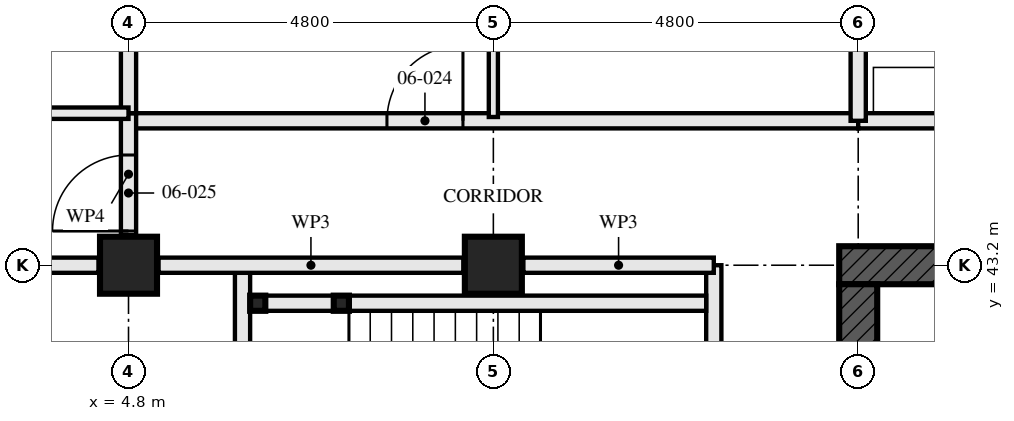
"""IFC4 building model, lengths in metres.
Left out: names, types, materials, properties, quantities, classifications, styles, units other than length and angle.
Written with IfcOpenShell. Run it as: python <this file> out.ifc"""

import sys

from ifc_helpers import new_model, si_unit, direction, frame, frame_2d, origin, origin_2d, place, context, subcontext, project, spatial, rectangle, hollow_rectangle, extrude, element, fill, save


model = new_model("IFC4")
c1 = context("Model", 3, precision=1e-05, world=origin(), true_north=direction((0.0, 1.0)))
c2 = subcontext(c1, "Body", "Model", "MODEL_VIEW")
j1 = project(units=[si_unit("LENGTHUNIT", "METRE"), si_unit("PLANEANGLEUNIT", "RADIAN")], contexts=[c1])
p1 = place(None, origin())
s1 = spatial("IfcSite", under=j1, at=p1, CompositionType="ELEMENT")
p2 = place(p1, origin())
s2 = spatial("IfcBuilding", under=s1, at=p2, CompositionType="ELEMENT")
p3 = place(p2, frame((0.0, 0.0, 27.0)))
s3 = spatial("IfcBuildingStorey", under=s2, at=p3, CompositionType="ELEMENT", Elevation=27.0)
for number, where, z_axis, x_axis in (
    (1, (4.8, 43.2, 0.0), (0.0, 0.0, 1.0), (0.0, 1.0, 0.0)),
    (2, (9.6, 43.2, 0.0), (0.0, 0.0, 1.0), (0.0, 1.0, 0.0)),
):
    element("IfcColumn", number, at=place(p3, frame(where, z_axis=z_axis, x_axis=x_axis)), inside=s3, PredefinedType="COLUMN", context=c2, shape_type="SweptSolid", body=[
        extrude(hollow_rectangle(XDim=0.75, YDim=0.75, WallThickness=0.08, at=origin_2d()), origin(), (0.0, 0.0, 1.0), 3.5),
    ])
p4 = place(p3, frame((29.05, 43.2, -0.17), z_axis=(0.0, 0.0, 1.0), x_axis=(-1.0, 0.0, 0.0)))
e3 = element("IfcWall", 3, at=p4, inside=s3, PredefinedType="SHEAR", context=c2, shape_type="SweptSolid", body=[
    extrude(rectangle(XDim=14.9, YDim=0.5, at=frame_2d((7.45, 0.0))), origin(), (0.0, 0.0, 1.0), 3.5),
])
p5 = place(p4, frame((6.85, 0.0, 0.17)))
e4 = element("IfcOpeningElement", 4, at=p5, cuts=e3, PredefinedType="OPENING", context=c2, shape_type="SweptSolid", body=[
    extrude(rectangle(XDim=1.2, YDim=2.1, at=frame_2d((0.6, 1.05))), frame((0.0, 0.26, 0.0), z_axis=(0.0, -1.0, 0.0), x_axis=(1.0, 0.0, 0.0)), (0.0, 0.0, 1.0), 0.521),
])
p6 = place(p3, frame((14.4, 42.95, -0.17), z_axis=(0.0, 0.0, 1.0), x_axis=(0.0, -1.0, 0.0)))
e5 = element("IfcWall", 5, at=p6, inside=s3, PredefinedType="SHEAR", context=c2, shape_type="SweptSolid", body=[
    extrude(rectangle(XDim=13.9, YDim=0.5, at=frame_2d((6.95, 0.0))), origin(), (0.0, 0.0, 1.0), 3.5),
])
p7 = place(p6, frame((6.35, 0.0, 0.17)))
e6 = element("IfcOpeningElement", 6, at=p7, cuts=e5, PredefinedType="OPENING", context=c2, shape_type="SweptSolid", body=[
    extrude(rectangle(XDim=1.2, YDim=2.1, at=frame_2d((0.6, 1.05))), frame((0.0, 0.26, 0.0), z_axis=(0.0, -1.0, 0.0), x_axis=(1.0, 0.0, 0.0)), (0.0, 0.0, 1.0), 0.521),
])
for number, where, z_axis, x_axis in (
    (7, (6.5, 42.7, 0.0), (0.0, 0.0, 1.0), (1.0, 0.0, 0.0)),
    (8, (7.6, 42.7, 0.0), (0.0, 0.0, 1.0), (1.0, 0.0, 0.0)),
):
    element("IfcColumn", number, at=place(p3, frame(where, z_axis=z_axis, x_axis=x_axis)), inside=s3, PredefinedType="COLUMN", context=c2, shape_type="SweptSolid", body=[
        extrude(hollow_rectangle(XDim=0.2, YDim=0.2, WallThickness=0.008, at=origin_2d()), origin(), (0.0, 0.0, 1.0), 3.33),
    ])
p8 = place(p3, frame((6.6, 42.7, 0.0), z_axis=(0.0, 0.0, 1.0), x_axis=(1.0, 0.0, 0.0)))
e9 = element("IfcWall", 9, at=p8, inside=s3, PredefinedType="SOLIDWALL", context=c2, shape_type="SweptSolid", body=[
    extrude(rectangle(XDim=0.9, YDim=0.2, at=frame_2d((0.45, 0.0))), origin(), (0.0, 0.0, 1.0), 2.99),
])
p9 = place(p3, frame((7.7, 42.7, 0.0), z_axis=(0.0, 0.0, 1.0), x_axis=(1.0, 0.0, 0.0)))
e10 = element("IfcWall", 10, at=p9, inside=s3, PredefinedType="SOLIDWALL", context=c2, shape_type="SweptSolid", body=[
    extrude(rectangle(XDim=4.7, YDim=0.2, at=frame_2d((2.35, 0.0))), origin(), (0.0, 0.0, 1.0), 2.99),
])
p10 = place(p3, frame((6.3, 43.1, 0.0), z_axis=(0.0, 0.0, 1.0), x_axis=(0.0, -1.0, 0.0)))
e11 = element("IfcWall", 11, at=p10, inside=s3, PredefinedType="SOLIDWALL", context=c2, shape_type="SweptSolid", body=[
    extrude(rectangle(XDim=3.3, YDim=0.2, at=frame_2d((1.65, 0.0))), origin(), (0.0, 0.0, 1.0), 3.33),
])
p11 = place(p3, frame((12.5, 43.2, 0.0), z_axis=(0.0, 0.0, 1.0), x_axis=(0.0, -1.0, 0.0)))
e12 = element("IfcWall", 12, at=p11, inside=s3, PredefinedType="PARTITIONING", context=c2, shape_type="SweptSolid", body=[
    extrude(rectangle(XDim=14.4, YDim=0.2, at=frame_2d((7.2, 0.0))), origin(), (0.0, 0.0, 1.0), 2.55),
])
p12 = place(p11, frame((1.4, 0.0, 0.0)))
e13 = element("IfcOpeningElement", 13, at=p12, cuts=e12, PredefinedType="OPENING", context=c2, shape_type="SweptSolid", body=[
    extrude(rectangle(XDim=1.0, YDim=2.1, at=frame_2d((0.5, 1.05))), frame((0.0, 0.111, 0.0), z_axis=(0.0, -1.0, 0.0), x_axis=(1.0, 0.0, 0.0)), (0.0, 0.0, 1.0), 0.221),
])
p13 = place(p11, frame((5.2, 0.0, 0.0)))
e14 = element("IfcOpeningElement", 14, at=p13, cuts=e12, PredefinedType="OPENING", context=c2, shape_type="SweptSolid", body=[
    extrude(rectangle(XDim=1.0, YDim=2.1, at=frame_2d((0.5, 1.05))), frame((0.0, 0.111, 0.0), z_axis=(0.0, -1.0, 0.0), x_axis=(1.0, 0.0, 0.0)), (0.0, 0.0, 1.0), 0.221),
])
p14 = place(p11, frame((10.0, 0.0, 0.0)))
e15 = element("IfcOpeningElement", 15, at=p14, cuts=e12, PredefinedType="OPENING", context=c2, shape_type="SweptSolid", body=[
    extrude(rectangle(XDim=1.0, YDim=2.1, at=frame_2d((0.5, 1.05))), frame((0.0, 0.111, 0.0), z_axis=(0.0, -1.0, 0.0), x_axis=(1.0, 0.0, 0.0)), (0.0, 0.0, 1.0), 0.221),
])
p15 = place(p3, frame((9.6, 52.2, 0.0), z_axis=(0.0, 0.0, 1.0), x_axis=(0.0, -1.0, 0.0)))
e16 = element("IfcWall", 16, at=p15, inside=s3, PredefinedType="PARTITIONING", context=c2, shape_type="SweptSolid", body=[
    extrude(rectangle(XDim=7.05, YDim=0.12, at=frame_2d((3.525, 0.0))), origin(), (0.0, 0.0, 1.0), 2.55),
])
p16 = place(p15, frame((3.075, 0.0, 0.0)))
e17 = element("IfcOpeningElement", 17, at=p16, cuts=e16, PredefinedType="OPENING", context=c2, shape_type="SweptSolid", body=[
    extrude(rectangle(XDim=0.9, YDim=2.1, at=frame_2d((0.45, 1.05))), frame((0.0, 0.071, 0.0), z_axis=(0.0, -1.0, 0.0), x_axis=(1.0, 0.0, 0.0)), (0.0, 0.0, 1.0), 0.141),
])
p17 = place(p3, frame((4.8, 52.48, 0.0), z_axis=(0.0, 0.0, 1.0), x_axis=(0.0, -1.0, 0.0)))
e18 = element("IfcWall", 18, at=p17, inside=s3, PredefinedType="PARTITIONING", context=c2, shape_type="SweptSolid", body=[
    extrude(rectangle(XDim=7.28, YDim=0.2, at=frame_2d((3.64, 0.0))), origin(), (0.0, 0.0, 1.0), 2.55),
])
p18 = place(p3, frame((4.8, 45.2, 0.0), z_axis=(0.0, 0.0, 1.0), x_axis=(-1.0, 0.0, 0.0)))
e19 = element("IfcWall", 19, at=p18, inside=s3, PredefinedType="PARTITIONING", context=c2, shape_type="SweptSolid", body=[
    extrude(rectangle(XDim=2.8, YDim=0.15, at=frame_2d((1.4, 0.0))), origin(), (0.0, 0.0, 1.0), 3.33),
])
p19 = place(p3, frame((14.4, 45.1, 0.0), z_axis=(0.0, 0.0, 1.0), x_axis=(-1.0, 0.0, 0.0)))
e20 = element("IfcWall", 20, at=p19, inside=s3, PredefinedType="PARTITIONING", context=c2, shape_type="SweptSolid", body=[
    extrude(rectangle(XDim=9.6, YDim=0.2, at=frame_2d((4.8, 0.0))), origin(), (0.0, 0.0, 1.0), 3.33),
])
p20 = place(p19, frame((5.2, 0.0, 0.0)))
e21 = element("IfcOpeningElement", 21, at=p20, cuts=e20, PredefinedType="OPENING", context=c2, shape_type="SweptSolid", body=[
    extrude(rectangle(XDim=1.0, YDim=2.1, at=frame_2d((0.5, 1.05))), frame((0.0, 0.111, 0.0), z_axis=(0.0, -1.0, 0.0), x_axis=(1.0, 0.0, 0.0)), (0.0, 0.0, 1.0), 0.221),
])
p21 = place(p3, frame((4.8, 45.2, 0.0), z_axis=(0.0, 0.0, 1.0), x_axis=(0.0, -1.0, 0.0)))
e22 = element("IfcWall", 22, at=p21, inside=s3, PredefinedType="PARTITIONING", context=c2, shape_type="SweptSolid", body=[
    extrude(rectangle(XDim=1.605, YDim=0.2, at=frame_2d((0.802, 0.0))), origin(), (0.0, 0.0, 1.0), 3.33),
])
p22 = place(p21, frame((0.55, 0.0, 0.0)))
e23 = element("IfcOpeningElement", 23, at=p22, cuts=e22, PredefinedType="OPENING", context=c2, shape_type="SweptSolid", body=[
    extrude(rectangle(XDim=1.0, YDim=2.1, at=frame_2d((0.5, 1.05))), frame((0.0, 0.111, 0.0), z_axis=(0.0, -1.0, 0.0), x_axis=(1.0, 0.0, 0.0)), (0.0, 0.0, 1.0), 0.221),
])
p23 = place(p3, frame((28.8, 45.1, 0.0), z_axis=(0.0, 0.0, 1.0), x_axis=(-1.0, 0.0, 0.0)))
e24 = element("IfcWall", 24, at=p23, inside=s3, PredefinedType="PARTITIONING", context=c2, shape_type="SweptSolid", body=[
    extrude(rectangle(XDim=14.4, YDim=0.2, at=frame_2d((7.2, 0.0))), origin(), (0.0, 0.0, 1.0), 3.33),
])
p24 = place(p23, frame((5.2, 0.0, 0.0)))
e25 = element("IfcOpeningElement", 25, at=p24, cuts=e24, PredefinedType="OPENING", context=c2, shape_type="SweptSolid", body=[
    extrude(rectangle(XDim=1.0, YDim=2.1, at=frame_2d((0.5, 1.05))), frame((0.0, 0.111, 0.0), z_axis=(0.0, -1.0, 0.0), x_axis=(1.0, 0.0, 0.0)), (0.0, 0.0, 1.0), 0.221),
])
p25 = place(p23, frame((10.0, 0.0, 0.0)))
e26 = element("IfcOpeningElement", 26, at=p25, cuts=e24, PredefinedType="OPENING", context=c2, shape_type="SweptSolid", body=[
    extrude(rectangle(XDim=1.0, YDim=2.1, at=frame_2d((0.5, 1.05))), frame((0.0, 0.111, 0.0), z_axis=(0.0, -1.0, 0.0), x_axis=(1.0, 0.0, 0.0)), (0.0, 0.0, 1.0), 0.221),
])
p26 = place(p3, frame((12.5, 43.2, 0.0), z_axis=(0.0, 0.0, 1.0), x_axis=(-1.0, 0.0, 0.0)))
e27 = element("IfcWall", 27, at=p26, inside=s3, PredefinedType="PARTITIONING", context=c2, shape_type="SweptSolid", body=[
    extrude(rectangle(XDim=2.505, YDim=0.2, at=frame_2d((1.252, 0.0))), origin(), (0.0, 0.0, 1.0), 2.32),
])
p27 = place(p3, frame((9.205, 43.2, 0.0), z_axis=(0.0, 0.0, 1.0), x_axis=(-1.0, 0.0, 0.0)))
e28 = element("IfcWall", 28, at=p27, inside=s3, PredefinedType="PARTITIONING", context=c2, shape_type="SweptSolid", body=[
    extrude(rectangle(XDim=4.01, YDim=0.2, at=frame_2d((2.005, 0.0))), origin(), (0.0, 0.0, 1.0), 2.32),
])
p28 = place(p3, frame((4.405, 43.2, 0.0), z_axis=(0.0, 0.0, 1.0), x_axis=(-1.0, 0.0, 0.0)))
e29 = element("IfcWall", 29, at=p28, inside=s3, PredefinedType="PARTITIONING", context=c2, shape_type="SweptSolid", body=[
    extrude(rectangle(XDim=4.085, YDim=0.2, at=frame_2d((2.042, 0.0))), origin(), (0.0, 0.0, 1.0), 2.32),
])
p29 = place(p3, frame((14.4, 45.1, 0.0), z_axis=(0.0, 0.0, 1.0), x_axis=(0.0, 1.0, 0.0)))
e30 = element("IfcWall", 30, at=p29, inside=s3, PredefinedType="PARTITIONING", context=c2, shape_type="SweptSolid", body=[
    extrude(rectangle(XDim=2.53, YDim=0.2, at=frame_2d((1.265, 0.0))), origin(), (0.0, 0.0, 1.0), 2.32),
])
p30 = place(p20, frame((1.0, 0.0, 0.0), z_axis=(0.0, 0.0, 1.0), x_axis=(-1.0, 0.0, 0.0)))
e31 = element("IfcDoor", 31, at=p30, inside=s3, OperationType="SINGLE_SWING_LEFT", PredefinedType="DOOR", context=c2, shape_type="SweptSolid", body=[
    extrude(rectangle(XDim=1.0, YDim=2.1, at=frame_2d((0.5, 1.05))), frame((0.0, 0.027, 0.0), z_axis=(0.0, -1.0, 0.0), x_axis=(1.0, 0.0, 0.0)), (0.0, 0.0, 1.0), 0.054),
])
fill(e21, e31)
p31 = place(p22, frame((1.0, 0.0, 0.0), z_axis=(0.0, 0.0, 1.0), x_axis=(-1.0, 0.0, 0.0)))
e32 = element("IfcDoor", 32, at=p31, inside=s3, OperationType="SINGLE_SWING_RIGHT", PredefinedType="DOOR", context=c2, shape_type="SweptSolid", body=[
    extrude(rectangle(XDim=1.0, YDim=2.1, at=frame_2d((0.5, 1.05))), frame((0.0, 0.027, 0.0), z_axis=(0.0, -1.0, 0.0), x_axis=(1.0, 0.0, 0.0)), (0.0, 0.0, 1.0), 0.054),
])
fill(e23, e32)
save(model, sys.argv[1])
